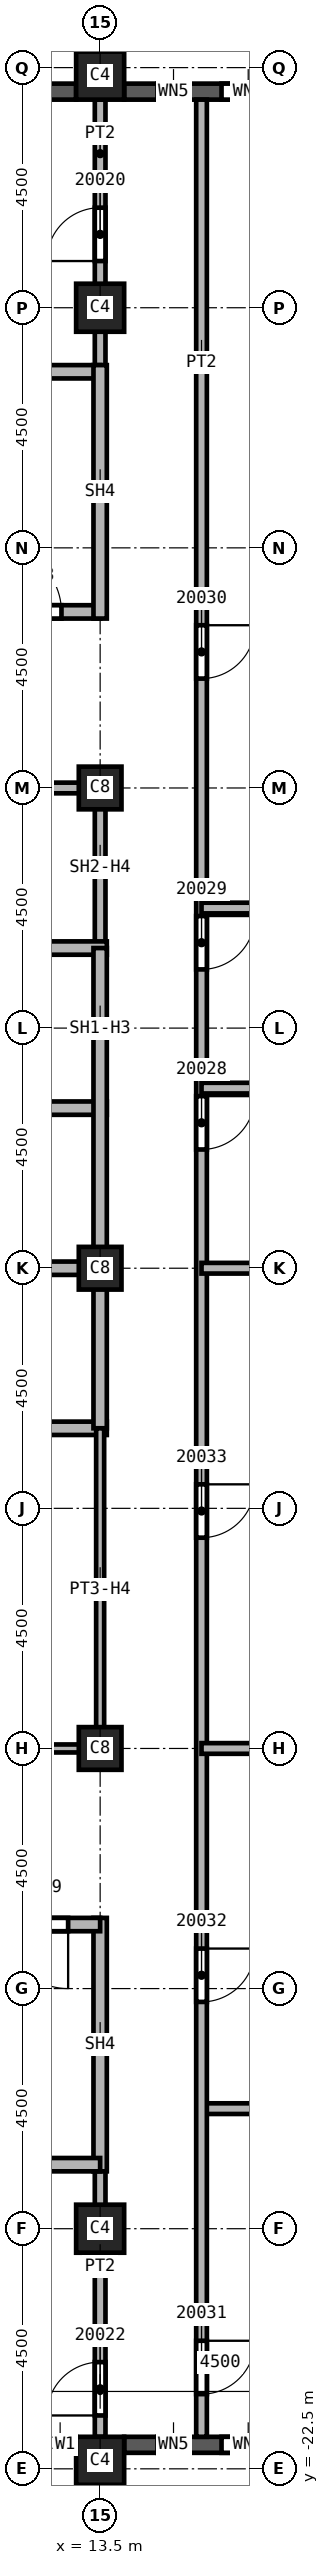
"""IFC4 building model, lengths in metres.
Left out: names, types, materials, properties, quantities, classifications, styles, units other than length and angle.
Written with IfcOpenShell. Run it as: python <this file> out.ifc"""

import sys

from ifc_helpers import new_model, si_unit, direction, frame, frame_2d, origin, origin_2d, place, context, subcontext, project, spatial, rectangle, extrude, element, fill, save


model = new_model("IFC4")
c1 = context("Model", 3, precision=1e-05, world=origin(), true_north=direction((0.0, 1.0)))
c2 = subcontext(c1, "Body", "Model", "MODEL_VIEW")
j1 = project(units=[si_unit("LENGTHUNIT", "METRE"), si_unit("PLANEANGLEUNIT", "RADIAN")], contexts=[c1])
p1 = place(None, origin())
s1 = spatial("IfcSite", under=j1, at=p1, CompositionType="ELEMENT")
p2 = place(p1, origin())
s2 = spatial("IfcBuilding", under=s1, at=p2, CompositionType="ELEMENT")
p3 = place(p2, frame((0.0, 0.0, 286.0)))
s3 = spatial("IfcBuildingStorey", under=s2, at=p3, CompositionType="ELEMENT", Elevation=286.0)
for number, where, z_axis, x_axis in (
    (1, (13.5, 18.0, 0.0), (0.0, 0.0, 1.0), (1.0, 0.0, 0.0)),
    (2, (13.5, -18.0, 0.0), (0.0, 0.0, 1.0), (1.0, 0.0, 0.0)),
):
    element("IfcColumn", number, at=place(p3, frame(where, z_axis=z_axis, x_axis=x_axis)), inside=s3, PredefinedType="COLUMN", context=c2, shape_type="SweptSolid", body=[
        extrude(rectangle(XDim=0.9, YDim=0.9, at=origin_2d()), origin(), (0.0, 0.0, 1.0), 3.72),
    ])
for number, where, z_axis, x_axis in (
    (3, (13.5, 0.0, 0.0), (0.0, 0.0, 1.0), (1.0, 0.0, 0.0)),
    (4, (13.5, 9.0, 0.0), (0.0, 0.0, 1.0), (1.0, 0.0, 0.0)),
    (5, (13.5, -9.0, 0.0), (0.0, 0.0, 1.0), (1.0, 0.0, 0.0)),
):
    element("IfcColumn", number, at=place(p3, frame(where, z_axis=z_axis, x_axis=x_axis)), inside=s3, PredefinedType="COLUMN", context=c2, shape_type="SweptSolid", body=[
        extrude(rectangle(XDim=0.8, YDim=0.8, at=origin_2d()), origin(), (0.0, 0.0, 1.0), 3.72),
    ])
for number, where, z_axis, x_axis in (
    (6, (13.5, 22.35, 0.0), (0.0, 0.0, 1.0), (1.0, 0.0, 0.0)),
    (7, (13.5, -22.35, 0.0), (0.0, 0.0, 1.0), (1.0, 0.0, 0.0)),
):
    element("IfcColumn", number, at=place(p3, frame(where, z_axis=z_axis, x_axis=x_axis)), inside=s3, PredefinedType="COLUMN", context=c2, shape_type="SweptSolid", body=[
        extrude(rectangle(XDim=0.9, YDim=0.9, at=origin_2d()), origin(), (0.0, 0.0, 1.0), 3.72),
    ])
p4 = place(p3, frame((9.45, -22.05, 0.0), z_axis=(0.0, 0.0, 1.0), x_axis=(1.0, 0.0, 0.0)))
e8 = element("IfcWall", 8, at=p4, inside=s3, PredefinedType="SOLIDWALL", context=c2, shape_type="SweptSolid", body=[
    extrude(rectangle(XDim=3.6, YDim=0.3, at=frame_2d((1.8, 0.0))), origin(), (0.0, 0.0, 1.0), 3.12),
])
p5 = place(p4, frame((0.6, 0.0, 0.8)))
e9 = element("IfcOpeningElement", 9, at=p5, cuts=e8, PredefinedType="OPENING", context=c2, shape_type="SweptSolid", body=[
    extrude(rectangle(XDim=2.4, YDim=1.95, at=frame_2d((1.2, 0.975))), frame((0.0, 0.15, 0.0), z_axis=(0.0, -1.0, 0.0), x_axis=(1.0, 0.0, 0.0)), (0.0, 0.0, 1.0), 0.3),
])
p6 = place(p3, frame((13.95, -22.05, 0.0), z_axis=(0.0, 0.0, 1.0), x_axis=(1.0, 0.0, 0.0)))
e10 = element("IfcWall", 10, at=p6, inside=s3, PredefinedType="SOLIDWALL", context=c2, shape_type="SweptSolid", body=[
    extrude(rectangle(XDim=3.6, YDim=0.3, at=frame_2d((1.8, 0.0))), origin(), (0.0, 0.0, 1.0), 3.12),
])
p7 = place(p6, frame((0.625, 0.0, 0.8)))
e11 = element("IfcOpeningElement", 11, at=p7, cuts=e10, PredefinedType="OPENING", context=c2, shape_type="SweptSolid", body=[
    extrude(rectangle(XDim=0.6, YDim=1.95, at=frame_2d((0.3, 0.975))), frame((0.0, 0.15, 0.0), z_axis=(0.0, -1.0, 0.0), x_axis=(1.0, 0.0, 0.0)), (0.0, 0.0, 1.0), 0.3),
])
p8 = place(p6, frame((1.825, 0.0, 0.8)))
e12 = element("IfcOpeningElement", 12, at=p8, cuts=e10, PredefinedType="OPENING", context=c2, shape_type="SweptSolid", body=[
    extrude(rectangle(XDim=1.0, YDim=1.95, at=frame_2d((0.5, 0.975))), frame((0.0, 0.15, 0.0), z_axis=(0.0, -1.0, 0.0), x_axis=(1.0, 0.0, 0.0)), (0.0, 0.0, 1.0), 0.3),
])
p9 = place(p3, frame((17.55, 22.05, 0.0), z_axis=(0.0, 0.0, 1.0), x_axis=(-1.0, 0.0, 0.0)))
e13 = element("IfcWall", 13, at=p9, inside=s3, PredefinedType="SOLIDWALL", context=c2, shape_type="SweptSolid", body=[
    extrude(rectangle(XDim=3.6, YDim=0.3, at=frame_2d((1.8, 0.0))), origin(), (0.0, 0.0, 1.0), 3.12),
])
p10 = place(p9, frame((0.775, 0.0, 0.8)))
e14 = element("IfcOpeningElement", 14, at=p10, cuts=e13, PredefinedType="OPENING", context=c2, shape_type="SweptSolid", body=[
    extrude(rectangle(XDim=1.0, YDim=1.95, at=frame_2d((0.5, 0.975))), frame((0.0, 0.15, 0.0), z_axis=(0.0, -1.0, 0.0), x_axis=(1.0, 0.0, 0.0)), (0.0, 0.0, 1.0), 0.3),
])
p11 = place(p9, frame((2.375, 0.0, 0.8)))
e15 = element("IfcOpeningElement", 15, at=p11, cuts=e13, PredefinedType="OPENING", context=c2, shape_type="SweptSolid", body=[
    extrude(rectangle(XDim=0.6, YDim=1.95, at=frame_2d((0.3, 0.975))), frame((0.0, 0.15, 0.0), z_axis=(0.0, -1.0, 0.0), x_axis=(1.0, 0.0, 0.0)), (0.0, 0.0, 1.0), 0.3),
])
p12 = place(p3, frame((13.05, 22.05, 0.0), z_axis=(0.0, 0.0, 1.0), x_axis=(-1.0, 0.0, 0.0)))
e16 = element("IfcWall", 16, at=p12, inside=s3, PredefinedType="SOLIDWALL", context=c2, shape_type="SweptSolid", body=[
    extrude(rectangle(XDim=3.6, YDim=0.3, at=frame_2d((1.8, 0.0))), origin(), (0.0, 0.0, 1.0), 3.12),
])
p13 = place(p12, frame((0.6, 0.0, 0.8)))
e17 = element("IfcOpeningElement", 17, at=p13, cuts=e16, PredefinedType="OPENING", context=c2, shape_type="SweptSolid", body=[
    extrude(rectangle(XDim=2.4, YDim=1.95, at=frame_2d((1.2, 0.975))), frame((0.0, 0.15, 0.0), z_axis=(0.0, -1.0, 0.0), x_axis=(1.0, 0.0, 0.0)), (0.0, 0.0, 1.0), 0.3),
])
p14 = place(p3, frame((13.5, -21.9, 0.0), z_axis=(0.0, 0.0, 1.0), x_axis=(0.0, 1.0, 0.0)))
e18 = element("IfcWall", 18, at=p14, inside=s3, PredefinedType="PARTITIONING", context=c2, shape_type="SweptSolid", body=[
    extrude(rectangle(XDim=5.225, YDim=0.2, at=frame_2d((2.612, 0.0))), origin(), (0.0, 0.0, 1.0), 3.72),
])
p15 = place(p14, frame((0.4, 0.0, 0.0)))
e19 = element("IfcOpeningElement", 19, at=p15, cuts=e18, PredefinedType="OPENING", context=c2, shape_type="SweptSolid", body=[
    extrude(rectangle(XDim=1.0, YDim=2.1, at=frame_2d((0.5, 1.05))), frame((0.0, 0.1, 0.0), z_axis=(0.0, -1.0, 0.0), x_axis=(1.0, 0.0, 0.0)), (0.0, 0.0, 1.0), 0.2),
])
p16 = place(p3, frame((13.5, 16.675, 0.0), z_axis=(0.0, 0.0, 1.0), x_axis=(0.0, 1.0, 0.0)))
e20 = element("IfcWall", 20, at=p16, inside=s3, PredefinedType="PARTITIONING", context=c2, shape_type="SweptSolid", body=[
    extrude(rectangle(XDim=5.225, YDim=0.2, at=frame_2d((2.612, 0.0))), origin(), (0.0, 0.0, 1.0), 3.72),
])
p17 = place(p16, frame((2.2, 0.0, 0.0)))
e21 = element("IfcOpeningElement", 21, at=p17, cuts=e20, PredefinedType="OPENING", context=c2, shape_type="SweptSolid", body=[
    extrude(rectangle(XDim=1.0, YDim=2.1, at=frame_2d((0.5, 1.05))), frame((0.0, 0.1, 0.0), z_axis=(0.0, -1.0, 0.0), x_axis=(1.0, 0.0, 0.0)), (0.0, 0.0, 1.0), 0.2),
])
p18 = place(p3, frame((15.4, -15.75, 0.0), z_axis=(0.0, 0.0, 1.0), x_axis=(1.0, 0.0, 0.0)))
e22 = element("IfcWall", 22, at=p18, inside=s3, PredefinedType="PARTITIONING", context=c2, shape_type="SweptSolid", body=[
    extrude(rectangle(XDim=11.15, YDim=0.2, at=frame_2d((5.575, 0.0))), origin(), (0.0, 0.0, 1.0), 3.72),
])
p19 = place(p3, frame((15.4, 21.9, 0.0), z_axis=(0.0, 0.0, 1.0), x_axis=(0.0, -1.0, 0.0)))
e23 = element("IfcWall", 23, at=p19, inside=s3, PredefinedType="PARTITIONING", context=c2, shape_type="SweptSolid", body=[
    extrude(rectangle(XDim=43.8, YDim=0.2, at=frame_2d((21.9, 0.0))), origin(), (0.0, 0.0, 1.0), 3.72),
])
p20 = place(p19, frame((18.675, 0.0, 0.0)))
e24 = element("IfcOpeningElement", 24, at=p20, cuts=e23, PredefinedType="OPENING", context=c2, shape_type="SweptSolid", body=[
    extrude(rectangle(XDim=1.0, YDim=2.1, at=frame_2d((0.5, 1.05))), frame((0.0, 0.1, 0.0), z_axis=(0.0, -1.0, 0.0), x_axis=(1.0, 0.0, 0.0)), (0.0, 0.0, 1.0), 0.2),
])
p21 = place(p19, frame((15.3, 0.0, 0.0)))
e25 = element("IfcOpeningElement", 25, at=p21, cuts=e23, PredefinedType="OPENING", context=c2, shape_type="SweptSolid", body=[
    extrude(rectangle(XDim=1.0, YDim=2.1, at=frame_2d((0.5, 1.05))), frame((0.0, 0.1, 0.0), z_axis=(0.0, -1.0, 0.0), x_axis=(1.0, 0.0, 0.0)), (0.0, 0.0, 1.0), 0.2),
])
p22 = place(p19, frame((9.85, 0.0, 0.0)))
e26 = element("IfcOpeningElement", 26, at=p22, cuts=e23, PredefinedType="OPENING", context=c2, shape_type="SweptSolid", body=[
    extrude(rectangle(XDim=1.0, YDim=2.1, at=frame_2d((0.5, 1.05))), frame((0.0, 0.1, 0.0), z_axis=(0.0, -1.0, 0.0), x_axis=(1.0, 0.0, 0.0)), (0.0, 0.0, 1.0), 0.2),
])
p23 = place(p19, frame((42.0, 0.0, 0.0)))
e27 = element("IfcOpeningElement", 27, at=p23, cuts=e23, PredefinedType="OPENING", context=c2, shape_type="SweptSolid", body=[
    extrude(rectangle(XDim=1.0, YDim=2.1, at=frame_2d((0.5, 1.05))), frame((0.0, 0.1, 0.0), z_axis=(0.0, -1.0, 0.0), x_axis=(1.0, 0.0, 0.0)), (0.0, 0.0, 1.0), 0.2),
])
p24 = place(p19, frame((34.65, 0.0, 0.0)))
e28 = element("IfcOpeningElement", 28, at=p24, cuts=e23, PredefinedType="OPENING", context=c2, shape_type="SweptSolid", body=[
    extrude(rectangle(XDim=1.0, YDim=2.1, at=frame_2d((0.5, 1.05))), frame((0.0, 0.1, 0.0), z_axis=(0.0, -1.0, 0.0), x_axis=(1.0, 0.0, 0.0)), (0.0, 0.0, 1.0), 0.2),
])
p25 = place(p19, frame((25.95, 0.0, 0.0)))
e29 = element("IfcOpeningElement", 29, at=p25, cuts=e23, PredefinedType="OPENING", context=c2, shape_type="SweptSolid", body=[
    extrude(rectangle(XDim=1.0, YDim=2.1, at=frame_2d((0.5, 1.05))), frame((0.0, 0.1, 0.0), z_axis=(0.0, -1.0, 0.0), x_axis=(1.0, 0.0, 0.0)), (0.0, 0.0, 1.0), 0.2),
])
p26 = place(p3, frame((15.4, -9.0, 0.0), z_axis=(0.0, 0.0, 1.0), x_axis=(1.0, 0.0, 0.0)))
e30 = element("IfcWall", 30, at=p26, inside=s3, PredefinedType="PARTITIONING", context=c2, shape_type="SweptSolid", body=[
    extrude(rectangle(XDim=4.6, YDim=0.2, at=frame_2d((2.3, 0.0))), origin(), (0.0, 0.0, 1.0), 3.72),
])
for number, where, z_axis, x_axis in (
    (31, (15.4, 3.375, 0.0), (0.0, 0.0, 1.0), (1.0, 0.0, 0.0)),
    (32, (15.4, 6.75, 0.0), (0.0, 0.0, 1.0), (1.0, 0.0, 0.0)),
    (33, (26.55, 0.0, 0.0), (0.0, 0.0, 1.0), (-1.0, 0.0, 0.0)),
):
    element("IfcWall", number, at=place(p3, frame(where, z_axis=z_axis, x_axis=x_axis)), inside=s3, PredefinedType="PARTITIONING", context=c2, shape_type="SweptSolid", body=[
        extrude(rectangle(XDim=11.15, YDim=0.2, at=frame_2d((5.575, 0.0))), origin(), (0.0, 0.0, 1.0), 3.72),
    ])
p27 = place(p3, frame((10.5, 9.0, 0.0), z_axis=(0.0, 0.0, 1.0), x_axis=(1.0, 0.0, 0.0)))
e34 = element("IfcWall", 34, at=p27, inside=s3, PredefinedType="SOLIDWALL", context=c2, shape_type="SweptSolid", body=[
    extrude(rectangle(XDim=3.0, YDim=0.2, at=frame_2d((1.5, 0.0))), origin(), (0.0, 0.0, 1.0), 3.042),
])
p28 = place(p3, frame((13.5, 9.1, 0.0), z_axis=(0.0, 0.0, 1.0), x_axis=(0.0, -1.0, 0.0)))
e35 = element("IfcWall", 35, at=p28, inside=s3, PredefinedType="SOLIDWALL", context=c2, shape_type="SweptSolid", body=[
    extrude(rectangle(XDim=3.1, YDim=0.2, at=frame_2d((1.55, 0.0))), origin(), (0.0, 0.0, 1.0), 3.042),
])
p29 = place(p3, frame((4.375, -3.0, 0.0), z_axis=(0.0, 0.0, 1.0), x_axis=(1.0, 0.0, 0.0)))
e36 = element("IfcWall", 36, at=p29, inside=s3, PredefinedType="SOLIDWALL", context=c2, shape_type="SweptSolid", body=[
    extrude(rectangle(XDim=9.25, YDim=0.25, at=frame_2d((4.625, 0.0))), origin(), (0.0, 0.0, 1.0), 3.72),
])
p30 = place(p29, frame((3.375, 0.0, 0.0)))
e37 = element("IfcOpeningElement", 37, at=p30, cuts=e36, PredefinedType="OPENING", context=c2, shape_type="SweptSolid", body=[
    extrude(rectangle(XDim=1.1, YDim=2.1, at=frame_2d((0.55, 1.05))), frame((0.0, 0.125, 0.0), z_axis=(0.0, -1.0, 0.0), x_axis=(1.0, 0.0, 0.0)), (0.0, 0.0, 1.0), 0.25),
])
p31 = place(p3, frame((7.5, 3.0, 0.0), z_axis=(0.0, 0.0, 1.0), x_axis=(1.0, 0.0, 0.0)))
e38 = element("IfcWall", 38, at=p31, inside=s3, PredefinedType="SOLIDWALL", context=c2, shape_type="SweptSolid", body=[
    extrude(rectangle(XDim=6.125, YDim=0.25, at=frame_2d((3.062, 0.0))), origin(), (0.0, 0.0, 1.0), 3.72),
])
p32 = place(p31, frame((0.25, 0.0, 0.0)))
e39 = element("IfcOpeningElement", 39, at=p32, cuts=e38, PredefinedType="OPENING", context=c2, shape_type="SweptSolid", body=[
    extrude(rectangle(XDim=1.1, YDim=2.1, at=frame_2d((0.55, 1.05))), frame((0.0, 0.125, 0.0), z_axis=(0.0, -1.0, 0.0), x_axis=(1.0, 0.0, 0.0)), (0.0, 0.0, 1.0), 0.25),
])
for number, where, z_axis, x_axis in (
    (40, (10.5, 0.0, 0.0), (0.0, 0.0, 1.0), (1.0, 0.0, 0.0)),
    (41, (10.5, 6.0, 0.0), (0.0, 0.0, 1.0), (1.0, 0.0, 0.0)),
):
    element("IfcWall", number, at=place(p3, frame(where, z_axis=z_axis, x_axis=x_axis)), inside=s3, PredefinedType="SOLIDWALL", context=c2, shape_type="SweptSolid", body=[
        extrude(rectangle(XDim=3.125, YDim=0.25, at=frame_2d((1.562, 0.0))), origin(), (0.0, 0.0, 1.0), 3.72),
    ])
p33 = place(p3, frame((13.5, 6.0, 0.0), z_axis=(0.0, 0.0, 1.0), x_axis=(0.0, -1.0, 0.0)))
e42 = element("IfcWall", 42, at=p33, inside=s3, PredefinedType="SOLIDWALL", context=c2, shape_type="SweptSolid", body=[
    extrude(rectangle(XDim=9.0, YDim=0.25, at=frame_2d((4.5, 0.0))), origin(), (0.0, 0.0, 1.0), 3.042),
])
p34 = place(p3, frame((4.375, 12.3, 0.0), z_axis=(0.0, 0.0, 1.0), x_axis=(1.0, 0.0, 0.0)))
e43 = element("IfcWall", 43, at=p34, inside=s3, PredefinedType="SOLIDWALL", context=c2, shape_type="SweptSolid", body=[
    extrude(rectangle(XDim=9.125, YDim=0.25, at=frame_2d((4.562, 0.0))), origin(), (0.0, 0.0, 1.0), 3.72),
])
p35 = place(p34, frame((7.2, 0.0, 0.0)))
e44 = element("IfcOpeningElement", 44, at=p35, cuts=e43, PredefinedType="OPENING", context=c2, shape_type="SweptSolid", body=[
    extrude(rectangle(XDim=1.2, YDim=2.1, at=frame_2d((0.6, 1.05))), frame((0.0, 0.125, 0.0), z_axis=(0.0, -1.0, 0.0), x_axis=(1.0, 0.0, 0.0)), (0.0, 0.0, 1.0), 0.25),
])
p36 = place(p3, frame((4.375, 16.8, 0.0), z_axis=(0.0, 0.0, 1.0), x_axis=(1.0, 0.0, 0.0)))
e45 = element("IfcWall", 45, at=p36, inside=s3, PredefinedType="SOLIDWALL", context=c2, shape_type="SweptSolid", body=[
    extrude(rectangle(XDim=9.125, YDim=0.25, at=frame_2d((4.562, 0.0))), origin(), (0.0, 0.0, 1.0), 3.72),
])
p37 = place(p3, frame((13.5, -16.925, 0.0), z_axis=(0.0, 0.0, 1.0), x_axis=(0.0, 1.0, 0.0)))
e46 = element("IfcWall", 46, at=p37, inside=s3, PredefinedType="SOLIDWALL", context=c2, shape_type="SweptSolid", body=[
    extrude(rectangle(XDim=4.75, YDim=0.25, at=frame_2d((2.375, 0.0))), origin(), (0.0, 0.0, 1.0), 3.72),
])
p38 = place(p3, frame((13.5, -16.8, 0.0), z_axis=(0.0, 0.0, 1.0), x_axis=(-1.0, 0.0, 0.0)))
e47 = element("IfcWall", 47, at=p38, inside=s3, PredefinedType="SOLIDWALL", context=c2, shape_type="SweptSolid", body=[
    extrude(rectangle(XDim=9.125, YDim=0.25, at=frame_2d((4.562, 0.0))), origin(), (0.0, 0.0, 1.0), 3.72),
])
p39 = place(p3, frame((13.5, -12.3, 0.0), z_axis=(0.0, 0.0, 1.0), x_axis=(-1.0, 0.0, 0.0)))
e48 = element("IfcWall", 48, at=p39, inside=s3, PredefinedType="SOLIDWALL", context=c2, shape_type="SweptSolid", body=[
    extrude(rectangle(XDim=9.125, YDim=0.25, at=frame_2d((4.562, 0.0))), origin(), (0.0, 0.0, 1.0), 3.72),
])
p40 = place(p39, frame((0.6, 0.0, 0.0)))
e49 = element("IfcOpeningElement", 49, at=p40, cuts=e48, PredefinedType="OPENING", context=c2, shape_type="SweptSolid", body=[
    extrude(rectangle(XDim=1.2, YDim=2.1, at=frame_2d((0.6, 1.05))), frame((0.0, 0.125, 0.0), z_axis=(0.0, -1.0, 0.0), x_axis=(1.0, 0.0, 0.0)), (0.0, 0.0, 1.0), 0.25),
])
p41 = place(p3, frame((13.5, 12.175, 0.0), z_axis=(0.0, 0.0, 1.0), x_axis=(0.0, 1.0, 0.0)))
e50 = element("IfcWall", 50, at=p41, inside=s3, PredefinedType="SOLIDWALL", context=c2, shape_type="SweptSolid", body=[
    extrude(rectangle(XDim=4.75, YDim=0.25, at=frame_2d((2.375, 0.0))), origin(), (0.0, 0.0, 1.0), 3.72),
])
p42 = place(p3, frame((13.5, -9.0, 0.0), z_axis=(0.0, 0.0, 1.0), x_axis=(-1.0, 0.0, 0.0)))
e51 = element("IfcWall", 51, at=p42, inside=s3, PredefinedType="PARTITIONING", context=c2, shape_type="SweptSolid", body=[
    extrude(rectangle(XDim=3.0, YDim=0.15, at=frame_2d((1.5, 0.0))), origin(), (0.0, 0.0, 1.0), 3.042),
])
p43 = place(p3, frame((13.5, -3.0, 0.0), z_axis=(0.0, 0.0, 1.0), x_axis=(0.0, -1.0, 0.0)))
e52 = element("IfcWall", 52, at=p43, inside=s3, PredefinedType="PARTITIONING", context=c2, shape_type="SweptSolid", body=[
    extrude(rectangle(XDim=6.075, YDim=0.15, at=frame_2d((3.038, 0.0))), origin(), (0.0, 0.0, 1.0), 3.042),
])
p44 = place(p35, origin())
e53 = element("IfcDoor", 53, at=p44, inside=s3, OperationType="SINGLE_SWING_LEFT", PredefinedType="DOOR", context=c2, shape_type="SweptSolid", body=[
    extrude(rectangle(XDim=1.2, YDim=2.1, at=frame_2d((0.6, 1.05))), frame((0.0, 0.025, 0.0), z_axis=(0.0, -1.0, 0.0), x_axis=(1.0, 0.0, 0.0)), (0.0, 0.0, 1.0), 0.05),
])
fill(e44, e53)
p45 = place(p40, origin())
e54 = element("IfcDoor", 54, at=p45, inside=s3, OperationType="SINGLE_SWING_RIGHT", PredefinedType="DOOR", context=c2, shape_type="SweptSolid", body=[
    extrude(rectangle(XDim=1.2, YDim=2.1, at=frame_2d((0.6, 1.05))), frame((0.0, 0.025, 0.0), z_axis=(0.0, -1.0, 0.0), x_axis=(1.0, 0.0, 0.0)), (0.0, 0.0, 1.0), 0.05),
])
fill(e49, e54)
p46 = place(p17, origin())
e55 = element("IfcDoor", 55, at=p46, inside=s3, OperationType="SINGLE_SWING_LEFT", PredefinedType="DOOR", context=c2, shape_type="SweptSolid", body=[
    extrude(rectangle(XDim=1.0, YDim=2.1, at=frame_2d((0.5, 1.05))), frame((0.0, 0.025, 0.0), z_axis=(0.0, -1.0, 0.0), x_axis=(1.0, 0.0, 0.0)), (0.0, 0.0, 1.0), 0.05),
])
fill(e21, e55)
p47 = place(p15, origin())
e56 = element("IfcDoor", 56, at=p47, inside=s3, OperationType="SINGLE_SWING_LEFT", PredefinedType="DOOR", context=c2, shape_type="SweptSolid", body=[
    extrude(rectangle(XDim=1.0, YDim=2.1, at=frame_2d((0.5, 1.05))), frame((0.0, 0.025, 0.0), z_axis=(0.0, -1.0, 0.0), x_axis=(1.0, 0.0, 0.0)), (0.0, 0.0, 1.0), 0.05),
])
fill(e19, e56)
p48 = place(p20, origin())
e57 = element("IfcDoor", 57, at=p48, inside=s3, OperationType="SINGLE_SWING_LEFT", PredefinedType="DOOR", context=c2, shape_type="SweptSolid", body=[
    extrude(rectangle(XDim=1.0, YDim=2.1, at=frame_2d((0.5, 1.05))), frame((0.0, 0.025, 0.0), z_axis=(0.0, -1.0, 0.0), x_axis=(1.0, 0.0, 0.0)), (0.0, 0.0, 1.0), 0.05),
])
fill(e24, e57)
p49 = place(p21, origin())
e58 = element("IfcDoor", 58, at=p49, inside=s3, OperationType="SINGLE_SWING_RIGHT", PredefinedType="DOOR", context=c2, shape_type="SweptSolid", body=[
    extrude(rectangle(XDim=1.0, YDim=2.1, at=frame_2d((0.5, 1.05))), frame((0.0, 0.025, 0.0), z_axis=(0.0, -1.0, 0.0), x_axis=(1.0, 0.0, 0.0)), (0.0, 0.0, 1.0), 0.05),
])
fill(e25, e58)
p50 = place(p22, origin())
e59 = element("IfcDoor", 59, at=p50, inside=s3, OperationType="SINGLE_SWING_LEFT", PredefinedType="DOOR", context=c2, shape_type="SweptSolid", body=[
    extrude(rectangle(XDim=1.0, YDim=2.1, at=frame_2d((0.5, 1.05))), frame((0.0, 0.025, 0.0), z_axis=(0.0, -1.0, 0.0), x_axis=(1.0, 0.0, 0.0)), (0.0, 0.0, 1.0), 0.05),
])
fill(e26, e59)
p51 = place(p23, origin())
e60 = element("IfcDoor", 60, at=p51, inside=s3, OperationType="SINGLE_SWING_RIGHT", PredefinedType="DOOR", context=c2, shape_type="SweptSolid", body=[
    extrude(rectangle(XDim=1.0, YDim=2.1, at=frame_2d((0.5, 1.05))), frame((0.0, 0.025, 0.0), z_axis=(0.0, -1.0, 0.0), x_axis=(1.0, 0.0, 0.0)), (0.0, 0.0, 1.0), 0.05),
])
fill(e27, e60)
p52 = place(p24, origin())
e61 = element("IfcDoor", 61, at=p52, inside=s3, OperationType="SINGLE_SWING_LEFT", PredefinedType="DOOR", context=c2, shape_type="SweptSolid", body=[
    extrude(rectangle(XDim=1.0, YDim=2.1, at=frame_2d((0.5, 1.05))), frame((0.0, 0.025, 0.0), z_axis=(0.0, -1.0, 0.0), x_axis=(1.0, 0.0, 0.0)), (0.0, 0.0, 1.0), 0.05),
])
fill(e28, e61)
p53 = place(p25, origin())
e62 = element("IfcDoor", 62, at=p53, inside=s3, OperationType="SINGLE_SWING_RIGHT", PredefinedType="DOOR", context=c2, shape_type="SweptSolid", body=[
    extrude(rectangle(XDim=1.0, YDim=2.1, at=frame_2d((0.5, 1.05))), frame((0.0, 0.025, 0.0), z_axis=(0.0, -1.0, 0.0), x_axis=(1.0, 0.0, 0.0)), (0.0, 0.0, 1.0), 0.05),
])
fill(e29, e62)
p54 = place(p7, origin())
e63 = element("IfcWindow", 63, at=p54, inside=s3, PartitioningType="SINGLE_PANEL", PredefinedType="WINDOW", context=c2, shape_type="SweptSolid", body=[
    extrude(rectangle(XDim=0.6, YDim=1.95, at=frame_2d((0.3, 0.975))), frame((0.0, 0.03, 0.0), z_axis=(0.0, -1.0, 0.0), x_axis=(1.0, 0.0, 0.0)), (0.0, 0.0, 1.0), 0.06),
])
fill(e11, e63)
p55 = place(p8, origin())
e64 = element("IfcWindow", 64, at=p55, inside=s3, PartitioningType="SINGLE_PANEL", PredefinedType="WINDOW", context=c2, shape_type="SweptSolid", body=[
    extrude(rectangle(XDim=1.0, YDim=1.95, at=frame_2d((0.5, 0.975))), frame((0.0, 0.03, 0.0), z_axis=(0.0, -1.0, 0.0), x_axis=(1.0, 0.0, 0.0)), (0.0, 0.0, 1.0), 0.06),
])
fill(e12, e64)
p56 = place(p10, origin())
e65 = element("IfcWindow", 65, at=p56, inside=s3, PartitioningType="SINGLE_PANEL", PredefinedType="WINDOW", context=c2, shape_type="SweptSolid", body=[
    extrude(rectangle(XDim=1.0, YDim=1.95, at=frame_2d((0.5, 0.975))), frame((0.0, 0.03, 0.0), z_axis=(0.0, -1.0, 0.0), x_axis=(1.0, 0.0, 0.0)), (0.0, 0.0, 1.0), 0.06),
])
fill(e14, e65)
p57 = place(p11, origin())
e66 = element("IfcWindow", 66, at=p57, inside=s3, PartitioningType="SINGLE_PANEL", PredefinedType="WINDOW", context=c2, shape_type="SweptSolid", body=[
    extrude(rectangle(XDim=0.6, YDim=1.95, at=frame_2d((0.3, 0.975))), frame((0.0, 0.03, 0.0), z_axis=(0.0, -1.0, 0.0), x_axis=(1.0, 0.0, 0.0)), (0.0, 0.0, 1.0), 0.06),
])
fill(e15, e66)
save(model, sys.argv[1])
